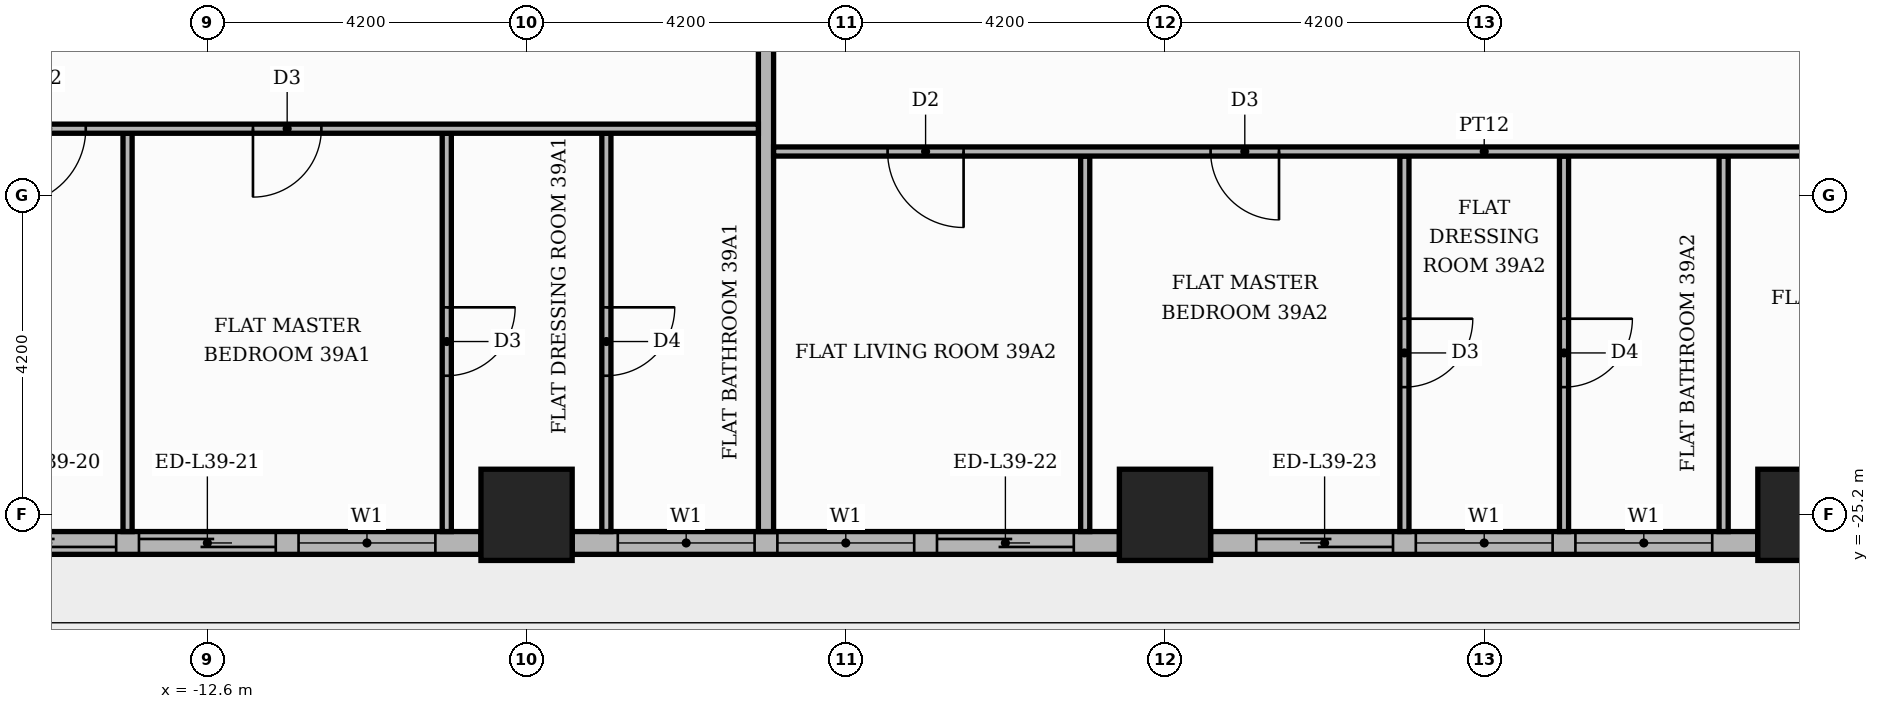
"""IFC4 building model, lengths in metres.
Left out: names, types, materials, properties, quantities, classifications, styles, units other than length and angle.
Written with IfcOpenShell. Run it as: python <this file> out.ifc"""

import sys

from ifc_helpers import new_model, si_unit, direction, frame, frame_2d, origin, origin_2d, place, context, subcontext, project, spatial, rectangle, extrude, element, fill, save


model = new_model("IFC4")
c1 = context("Model", 3, precision=1e-05, world=origin(), true_north=direction((0.0, 1.0)))
c2 = subcontext(c1, "Body", "Model", "MODEL_VIEW")
j1 = project(units=[si_unit("LENGTHUNIT", "METRE"), si_unit("PLANEANGLEUNIT", "RADIAN")], contexts=[c1])
p1 = place(None, origin())
s1 = spatial("IfcSite", under=j1, at=p1, CompositionType="ELEMENT")
p2 = place(p1, origin())
s2 = spatial("IfcBuilding", under=s1, at=p2, CompositionType="ELEMENT")
p3 = place(p2, frame((0.0, 0.0, 165.0)))
s3 = spatial("IfcBuildingStorey", under=s2, at=p3, CompositionType="ELEMENT", Elevation=165.0)
for number, where, z_axis, x_axis in (
    (1, (0.0, -25.2, 0.0), (0.0, 0.0, 1.0), (1.0, 0.0, 0.0)),
    (2, (8.4, -25.2, 0.0), (0.0, 0.0, 1.0), (1.0, 0.0, 0.0)),
    (3, (-8.4, -25.2, 0.0), (0.0, 0.0, 1.0), (1.0, 0.0, 0.0)),
):
    element("IfcColumn", number, at=place(p3, frame(where, z_axis=z_axis, x_axis=x_axis)), inside=s3, PredefinedType="COLUMN", context=c2, shape_type="SweptSolid", body=[
        extrude(rectangle(XDim=1.2, YDim=1.2, at=origin_2d()), origin(), (0.0, 0.0, 1.0), 3.9),
    ])
p4 = place(p3, frame((-16.2, -25.57, 0.0), z_axis=(0.0, 0.0, 1.0), x_axis=(1.0, 0.0, 0.0)))
e4 = element("IfcWall", 4, at=p4, inside=s3, PredefinedType="STANDARD", context=c2, shape_type="SweptSolid", body=[
    extrude(rectangle(XDim=7.2, YDim=0.3, at=frame_2d((3.6, 0.0))), origin(), (0.0, 0.0, 1.0), 3.48),
])
p5 = place(p4, frame((0.6, 0.0, 0.0)))
e5 = element("IfcOpeningElement", 5, at=p5, cuts=e4, PredefinedType="OPENING", context=c2, shape_type="SweptSolid", body=[
    extrude(rectangle(XDim=1.8, YDim=2.4, at=frame_2d((0.9, 1.2))), frame((0.0, 0.16, 0.0), z_axis=(0.0, -1.0, 0.0), x_axis=(1.0, 0.0, 0.0)), (0.0, 0.0, 1.0), 0.32),
])
p6 = place(p4, frame((2.7, 0.0, 0.0)))
e6 = element("IfcOpeningElement", 6, at=p6, cuts=e4, PredefinedType="OPENING", context=c2, shape_type="SweptSolid", body=[
    extrude(rectangle(XDim=1.8, YDim=2.4, at=frame_2d((0.9, 1.2))), frame((0.0, 0.16, 0.0), z_axis=(0.0, -1.0, 0.0), x_axis=(1.0, 0.0, 0.0)), (0.0, 0.0, 1.0), 0.32),
])
p7 = place(p4, frame((4.8, 0.0, 0.9)))
e7 = element("IfcOpeningElement", 7, at=p7, cuts=e4, PredefinedType="OPENING", context=c2, shape_type="SweptSolid", body=[
    extrude(rectangle(XDim=1.8, YDim=2.1, at=frame_2d((0.9, 1.05))), frame((0.0, 0.16, 0.0), z_axis=(0.0, -1.0, 0.0), x_axis=(1.0, 0.0, 0.0)), (0.0, 0.0, 1.0), 0.32),
])
p8 = place(p3, frame((-7.8, -25.57, 0.0), z_axis=(0.0, 0.0, 1.0), x_axis=(1.0, 0.0, 0.0)))
e8 = element("IfcWall", 8, at=p8, inside=s3, PredefinedType="STANDARD", context=c2, shape_type="SweptSolid", body=[
    extrude(rectangle(XDim=7.2, YDim=0.3, at=frame_2d((3.6, 0.0))), origin(), (0.0, 0.0, 1.0), 3.48),
])
p9 = place(p8, frame((0.6, 0.0, 0.9)))
e9 = element("IfcOpeningElement", 9, at=p9, cuts=e8, PredefinedType="OPENING", context=c2, shape_type="SweptSolid", body=[
    extrude(rectangle(XDim=1.8, YDim=2.1, at=frame_2d((0.9, 1.05))), frame((0.0, 0.16, 0.0), z_axis=(0.0, -1.0, 0.0), x_axis=(1.0, 0.0, 0.0)), (0.0, 0.0, 1.0), 0.32),
])
p10 = place(p8, frame((2.7, 0.0, 0.9)))
e10 = element("IfcOpeningElement", 10, at=p10, cuts=e8, PredefinedType="OPENING", context=c2, shape_type="SweptSolid", body=[
    extrude(rectangle(XDim=1.8, YDim=2.1, at=frame_2d((0.9, 1.05))), frame((0.0, 0.16, 0.0), z_axis=(0.0, -1.0, 0.0), x_axis=(1.0, 0.0, 0.0)), (0.0, 0.0, 1.0), 0.32),
])
p11 = place(p8, frame((4.8, 0.0, 0.0)))
e11 = element("IfcOpeningElement", 11, at=p11, cuts=e8, PredefinedType="OPENING", context=c2, shape_type="SweptSolid", body=[
    extrude(rectangle(XDim=1.8, YDim=2.4, at=frame_2d((0.9, 1.2))), frame((0.0, 0.16, 0.0), z_axis=(0.0, -1.0, 0.0), x_axis=(1.0, 0.0, 0.0)), (0.0, 0.0, 1.0), 0.32),
])
p12 = place(p3, frame((0.6, -25.57, 0.0), z_axis=(0.0, 0.0, 1.0), x_axis=(1.0, 0.0, 0.0)))
e12 = element("IfcWall", 12, at=p12, inside=s3, PredefinedType="STANDARD", context=c2, shape_type="SweptSolid", body=[
    extrude(rectangle(XDim=7.2, YDim=0.3, at=frame_2d((3.6, 0.0))), origin(), (0.0, 0.0, 1.0), 3.48),
])
p13 = place(p12, frame((0.6, 0.0, 0.0)))
e13 = element("IfcOpeningElement", 13, at=p13, cuts=e12, PredefinedType="OPENING", context=c2, shape_type="SweptSolid", body=[
    extrude(rectangle(XDim=1.8, YDim=2.4, at=frame_2d((0.9, 1.2))), frame((0.0, 0.16, 0.0), z_axis=(0.0, -1.0, 0.0), x_axis=(1.0, 0.0, 0.0)), (0.0, 0.0, 1.0), 0.32),
])
p14 = place(p12, frame((2.7, 0.0, 0.9)))
e14 = element("IfcOpeningElement", 14, at=p14, cuts=e12, PredefinedType="OPENING", context=c2, shape_type="SweptSolid", body=[
    extrude(rectangle(XDim=1.8, YDim=2.1, at=frame_2d((0.9, 1.05))), frame((0.0, 0.16, 0.0), z_axis=(0.0, -1.0, 0.0), x_axis=(1.0, 0.0, 0.0)), (0.0, 0.0, 1.0), 0.32),
])
p15 = place(p12, frame((4.8, 0.0, 0.9)))
e15 = element("IfcOpeningElement", 15, at=p15, cuts=e12, PredefinedType="OPENING", context=c2, shape_type="SweptSolid", body=[
    extrude(rectangle(XDim=1.8, YDim=2.1, at=frame_2d((0.9, 1.05))), frame((0.0, 0.16, 0.0), z_axis=(0.0, -1.0, 0.0), x_axis=(1.0, 0.0, 0.0)), (0.0, 0.0, 1.0), 0.32),
])
p16 = place(p3, frame((-13.65, -25.42, 0.0), z_axis=(0.0, 0.0, 1.0), x_axis=(0.0, 1.0, 0.0)))
e16 = element("IfcWall", 16, at=p16, inside=s3, PredefinedType="PARTITIONING", context=c2, shape_type="SweptSolid", body=[
    extrude(rectangle(XDim=5.24, YDim=0.12, at=frame_2d((2.62, 0.0))), origin(), (0.0, 0.0, 1.0), 3.48),
])
p17 = place(p3, frame((-9.45, -25.42, 0.0), z_axis=(0.0, 0.0, 1.0), x_axis=(0.0, 1.0, 0.0)))
e17 = element("IfcWall", 17, at=p17, inside=s3, PredefinedType="PARTITIONING", context=c2, shape_type="SweptSolid", body=[
    extrude(rectangle(XDim=5.24, YDim=0.12, at=frame_2d((2.62, 0.0))), origin(), (0.0, 0.0, 1.0), 3.48),
])
p18 = place(p17, frame((2.05, 0.0, 0.0)))
e18 = element("IfcOpeningElement", 18, at=p18, cuts=e17, PredefinedType="OPENING", context=c2, shape_type="SweptSolid", body=[
    extrude(rectangle(XDim=0.9, YDim=2.1, at=frame_2d((0.45, 1.05))), frame((0.0, 0.07, 0.0), z_axis=(0.0, -1.0, 0.0), x_axis=(1.0, 0.0, 0.0)), (0.0, 0.0, 1.0), 0.14),
])
p19 = place(p3, frame((-7.35, -25.42, 0.0), z_axis=(0.0, 0.0, 1.0), x_axis=(0.0, 1.0, 0.0)))
e19 = element("IfcWall", 19, at=p19, inside=s3, PredefinedType="PARTITIONING", context=c2, shape_type="SweptSolid", body=[
    extrude(rectangle(XDim=5.24, YDim=0.12, at=frame_2d((2.62, 0.0))), origin(), (0.0, 0.0, 1.0), 3.48),
])
p20 = place(p19, frame((2.05, 0.0, 0.0)))
e20 = element("IfcOpeningElement", 20, at=p20, cuts=e19, PredefinedType="OPENING", context=c2, shape_type="SweptSolid", body=[
    extrude(rectangle(XDim=0.9, YDim=2.1, at=frame_2d((0.45, 1.05))), frame((0.0, 0.07, 0.0), z_axis=(0.0, -1.0, 0.0), x_axis=(1.0, 0.0, 0.0)), (0.0, 0.0, 1.0), 0.14),
])
p21 = place(p3, frame((-5.25, -25.42, 0.0), z_axis=(0.0, 0.0, 1.0), x_axis=(0.0, 1.0, 0.0)))
e21 = element("IfcWall", 21, at=p21, inside=s3, PredefinedType="PARTITIONING", context=c2, shape_type="SweptSolid", body=[
    extrude(rectangle(XDim=11.67, YDim=0.2, at=frame_2d((5.835, 0.0))), origin(), (0.0, 0.0, 1.0), 3.48),
])
p22 = place(p3, frame((-1.05, -25.42, 0.0), z_axis=(0.0, 0.0, 1.0), x_axis=(0.0, 1.0, 0.0)))
e22 = element("IfcWall", 22, at=p22, inside=s3, PredefinedType="PARTITIONING", context=c2, shape_type="SweptSolid", body=[
    extrude(rectangle(XDim=4.94, YDim=0.12, at=frame_2d((2.47, 0.0))), origin(), (0.0, 0.0, 1.0), 3.48),
])
p23 = place(p3, frame((3.15, -25.42, 0.0), z_axis=(0.0, 0.0, 1.0), x_axis=(0.0, 1.0, 0.0)))
e23 = element("IfcWall", 23, at=p23, inside=s3, PredefinedType="PARTITIONING", context=c2, shape_type="SweptSolid", body=[
    extrude(rectangle(XDim=4.94, YDim=0.12, at=frame_2d((2.47, 0.0))), origin(), (0.0, 0.0, 1.0), 3.48),
])
p24 = place(p23, frame((1.9, 0.0, 0.0)))
e24 = element("IfcOpeningElement", 24, at=p24, cuts=e23, PredefinedType="OPENING", context=c2, shape_type="SweptSolid", body=[
    extrude(rectangle(XDim=0.9, YDim=2.1, at=frame_2d((0.45, 1.05))), frame((0.0, 0.07, 0.0), z_axis=(0.0, -1.0, 0.0), x_axis=(1.0, 0.0, 0.0)), (0.0, 0.0, 1.0), 0.14),
])
p25 = place(p3, frame((5.25, -25.42, 0.0), z_axis=(0.0, 0.0, 1.0), x_axis=(0.0, 1.0, 0.0)))
e25 = element("IfcWall", 25, at=p25, inside=s3, PredefinedType="PARTITIONING", context=c2, shape_type="SweptSolid", body=[
    extrude(rectangle(XDim=4.94, YDim=0.12, at=frame_2d((2.47, 0.0))), origin(), (0.0, 0.0, 1.0), 3.48),
])
p26 = place(p25, frame((1.9, 0.0, 0.0)))
e26 = element("IfcOpeningElement", 26, at=p26, cuts=e25, PredefinedType="OPENING", context=c2, shape_type="SweptSolid", body=[
    extrude(rectangle(XDim=0.9, YDim=2.1, at=frame_2d((0.45, 1.05))), frame((0.0, 0.07, 0.0), z_axis=(0.0, -1.0, 0.0), x_axis=(1.0, 0.0, 0.0)), (0.0, 0.0, 1.0), 0.14),
])
p27 = place(p3, frame((7.35, -25.42, 0.0), z_axis=(0.0, 0.0, 1.0), x_axis=(0.0, 1.0, 0.0)))
e27 = element("IfcWall", 27, at=p27, inside=s3, PredefinedType="PARTITIONING", context=c2, shape_type="SweptSolid", body=[
    extrude(rectangle(XDim=4.94, YDim=0.12, at=frame_2d((2.47, 0.0))), origin(), (0.0, 0.0, 1.0), 3.48),
])
p28 = place(p3, frame((-5.15, -20.42, 0.0), z_axis=(0.0, 0.0, 1.0), x_axis=(1.0, 0.0, 0.0)))
e28 = element("IfcWall", 28, at=p28, inside=s3, PredefinedType="PARTITIONING", context=c2, shape_type="SweptSolid", body=[
    extrude(rectangle(XDim=18.7, YDim=0.12, at=frame_2d((9.35, 0.0))), origin(), (0.0, 0.0, 1.0), 3.48),
])
p29 = place(p28, frame((1.5, 0.0, 0.0)))
e29 = element("IfcOpeningElement", 29, at=p29, cuts=e28, PredefinedType="OPENING", context=c2, shape_type="SweptSolid", body=[
    extrude(rectangle(XDim=1.0, YDim=2.1, at=frame_2d((0.5, 1.05))), frame((0.0, 0.07, 0.0), z_axis=(0.0, -1.0, 0.0), x_axis=(1.0, 0.0, 0.0)), (0.0, 0.0, 1.0), 0.14),
])
p30 = place(p28, frame((5.75, 0.0, 0.0)))
e30 = element("IfcOpeningElement", 30, at=p30, cuts=e28, PredefinedType="OPENING", context=c2, shape_type="SweptSolid", body=[
    extrude(rectangle(XDim=0.9, YDim=2.1, at=frame_2d((0.45, 1.05))), frame((0.0, 0.07, 0.0), z_axis=(0.0, -1.0, 0.0), x_axis=(1.0, 0.0, 0.0)), (0.0, 0.0, 1.0), 0.14),
])
p31 = place(p28, frame((14.15, 0.0, 0.0)))
e31 = element("IfcOpeningElement", 31, at=p31, cuts=e28, PredefinedType="OPENING", context=c2, shape_type="SweptSolid", body=[
    extrude(rectangle(XDim=0.9, YDim=2.1, at=frame_2d((0.45, 1.05))), frame((0.0, 0.07, 0.0), z_axis=(0.0, -1.0, 0.0), x_axis=(1.0, 0.0, 0.0)), (0.0, 0.0, 1.0), 0.14),
])
p32 = place(p3, frame((-25.42, -20.12, 0.0), z_axis=(0.0, 0.0, 1.0), x_axis=(1.0, 0.0, 0.0)))
e32 = element("IfcWall", 32, at=p32, inside=s3, PredefinedType="PARTITIONING", context=c2, shape_type="SweptSolid", body=[
    extrude(rectangle(XDim=20.07, YDim=0.12, at=frame_2d((10.035, 0.0))), origin(), (0.0, 0.0, 1.0), 3.48),
])
p33 = place(p32, frame((10.22, 0.0, 0.0)))
e33 = element("IfcOpeningElement", 33, at=p33, cuts=e32, PredefinedType="OPENING", context=c2, shape_type="SweptSolid", body=[
    extrude(rectangle(XDim=1.0, YDim=2.1, at=frame_2d((0.5, 1.05))), frame((0.0, 0.07, 0.0), z_axis=(0.0, -1.0, 0.0), x_axis=(1.0, 0.0, 0.0)), (0.0, 0.0, 1.0), 0.14),
])
p34 = place(p32, frame((13.42, 0.0, 0.0)))
e34 = element("IfcOpeningElement", 34, at=p34, cuts=e32, PredefinedType="OPENING", context=c2, shape_type="SweptSolid", body=[
    extrude(rectangle(XDim=0.9, YDim=2.1, at=frame_2d((0.45, 1.05))), frame((0.0, 0.07, 0.0), z_axis=(0.0, -1.0, 0.0), x_axis=(1.0, 0.0, 0.0)), (0.0, 0.0, 1.0), 0.14),
])
p35 = place(p5, origin())
e35 = element("IfcDoor", 35, at=p35, inside=s3, OperationType="SLIDING_TO_LEFT", PredefinedType="DOOR", context=c2, shape_type="SweptSolid", body=[
    extrude(rectangle(XDim=1.8, YDim=2.4, at=frame_2d((0.9, 1.2))), frame((0.0, 0.025, 0.0), z_axis=(0.0, -1.0, 0.0), x_axis=(1.0, 0.0, 0.0)), (0.0, 0.0, 1.0), 0.05),
])
fill(e5, e35)
p36 = place(p6, origin())
e36 = element("IfcDoor", 36, at=p36, inside=s3, OperationType="SLIDING_TO_RIGHT", PredefinedType="DOOR", context=c2, shape_type="SweptSolid", body=[
    extrude(rectangle(XDim=1.8, YDim=2.4, at=frame_2d((0.9, 1.2))), frame((0.0, 0.025, 0.0), z_axis=(0.0, -1.0, 0.0), x_axis=(1.0, 0.0, 0.0)), (0.0, 0.0, 1.0), 0.05),
])
fill(e6, e36)
p37 = place(p7, origin())
e37 = element("IfcWindow", 37, at=p37, inside=s3, PartitioningType="SINGLE_PANEL", PredefinedType="WINDOW", context=c2, shape_type="SweptSolid", body=[
    extrude(rectangle(XDim=1.8, YDim=2.1, at=frame_2d((0.9, 1.05))), frame((0.0, 0.03, 0.0), z_axis=(0.0, -1.0, 0.0), x_axis=(1.0, 0.0, 0.0)), (0.0, 0.0, 1.0), 0.06),
])
fill(e7, e37)
p38 = place(p9, origin())
e38 = element("IfcWindow", 38, at=p38, inside=s3, PartitioningType="SINGLE_PANEL", PredefinedType="WINDOW", context=c2, shape_type="SweptSolid", body=[
    extrude(rectangle(XDim=1.8, YDim=2.1, at=frame_2d((0.9, 1.05))), frame((0.0, 0.03, 0.0), z_axis=(0.0, -1.0, 0.0), x_axis=(1.0, 0.0, 0.0)), (0.0, 0.0, 1.0), 0.06),
])
fill(e9, e38)
p39 = place(p10, origin())
e39 = element("IfcWindow", 39, at=p39, inside=s3, PartitioningType="SINGLE_PANEL", PredefinedType="WINDOW", context=c2, shape_type="SweptSolid", body=[
    extrude(rectangle(XDim=1.8, YDim=2.1, at=frame_2d((0.9, 1.05))), frame((0.0, 0.03, 0.0), z_axis=(0.0, -1.0, 0.0), x_axis=(1.0, 0.0, 0.0)), (0.0, 0.0, 1.0), 0.06),
])
fill(e10, e39)
p40 = place(p11, origin())
e40 = element("IfcDoor", 40, at=p40, inside=s3, OperationType="SLIDING_TO_RIGHT", PredefinedType="DOOR", context=c2, shape_type="SweptSolid", body=[
    extrude(rectangle(XDim=1.8, YDim=2.4, at=frame_2d((0.9, 1.2))), frame((0.0, 0.025, 0.0), z_axis=(0.0, -1.0, 0.0), x_axis=(1.0, 0.0, 0.0)), (0.0, 0.0, 1.0), 0.05),
])
fill(e11, e40)
p41 = place(p13, origin())
e41 = element("IfcDoor", 41, at=p41, inside=s3, OperationType="SLIDING_TO_LEFT", PredefinedType="DOOR", context=c2, shape_type="SweptSolid", body=[
    extrude(rectangle(XDim=1.8, YDim=2.4, at=frame_2d((0.9, 1.2))), frame((0.0, 0.025, 0.0), z_axis=(0.0, -1.0, 0.0), x_axis=(1.0, 0.0, 0.0)), (0.0, 0.0, 1.0), 0.05),
])
fill(e13, e41)
p42 = place(p14, origin())
e42 = element("IfcWindow", 42, at=p42, inside=s3, PartitioningType="SINGLE_PANEL", PredefinedType="WINDOW", context=c2, shape_type="SweptSolid", body=[
    extrude(rectangle(XDim=1.8, YDim=2.1, at=frame_2d((0.9, 1.05))), frame((0.0, 0.03, 0.0), z_axis=(0.0, -1.0, 0.0), x_axis=(1.0, 0.0, 0.0)), (0.0, 0.0, 1.0), 0.06),
])
fill(e14, e42)
p43 = place(p15, origin())
e43 = element("IfcWindow", 43, at=p43, inside=s3, PartitioningType="SINGLE_PANEL", PredefinedType="WINDOW", context=c2, shape_type="SweptSolid", body=[
    extrude(rectangle(XDim=1.8, YDim=2.1, at=frame_2d((0.9, 1.05))), frame((0.0, 0.03, 0.0), z_axis=(0.0, -1.0, 0.0), x_axis=(1.0, 0.0, 0.0)), (0.0, 0.0, 1.0), 0.06),
])
fill(e15, e43)
p44 = place(p33, frame((1.0, 0.0, 0.0), z_axis=(0.0, 0.0, 1.0), x_axis=(-1.0, 0.0, 0.0)))
e44 = element("IfcDoor", 44, at=p44, inside=s3, OperationType="SINGLE_SWING_LEFT", PredefinedType="DOOR", context=c2, shape_type="SweptSolid", body=[
    extrude(rectangle(XDim=1.0, YDim=2.1, at=frame_2d((0.5, 1.05))), frame((0.0, 0.025, 0.0), z_axis=(0.0, -1.0, 0.0), x_axis=(1.0, 0.0, 0.0)), (0.0, 0.0, 1.0), 0.05),
])
fill(e33, e44)
p45 = place(p34, frame((0.9, 0.0, 0.0), z_axis=(0.0, 0.0, 1.0), x_axis=(-1.0, 0.0, 0.0)))
e45 = element("IfcDoor", 45, at=p45, inside=s3, OperationType="SINGLE_SWING_LEFT", PredefinedType="DOOR", context=c2, shape_type="SweptSolid", body=[
    extrude(rectangle(XDim=0.9, YDim=2.1, at=frame_2d((0.45, 1.05))), frame((0.0, 0.025, 0.0), z_axis=(0.0, -1.0, 0.0), x_axis=(1.0, 0.0, 0.0)), (0.0, 0.0, 1.0), 0.05),
])
fill(e34, e45)
p46 = place(p18, frame((0.9, 0.0, 0.0), z_axis=(0.0, 0.0, 1.0), x_axis=(-1.0, 0.0, 0.0)))
e46 = element("IfcDoor", 46, at=p46, inside=s3, OperationType="SINGLE_SWING_RIGHT", PredefinedType="DOOR", context=c2, shape_type="SweptSolid", body=[
    extrude(rectangle(XDim=0.9, YDim=2.1, at=frame_2d((0.45, 1.05))), frame((0.0, 0.025, 0.0), z_axis=(0.0, -1.0, 0.0), x_axis=(1.0, 0.0, 0.0)), (0.0, 0.0, 1.0), 0.05),
])
fill(e18, e46)
p47 = place(p20, frame((0.9, 0.0, 0.0), z_axis=(0.0, 0.0, 1.0), x_axis=(-1.0, 0.0, 0.0)))
e47 = element("IfcDoor", 47, at=p47, inside=s3, OperationType="SINGLE_SWING_RIGHT", PredefinedType="DOOR", context=c2, shape_type="SweptSolid", body=[
    extrude(rectangle(XDim=0.9, YDim=2.1, at=frame_2d((0.45, 1.05))), frame((0.0, 0.025, 0.0), z_axis=(0.0, -1.0, 0.0), x_axis=(1.0, 0.0, 0.0)), (0.0, 0.0, 1.0), 0.05),
])
fill(e20, e47)
p48 = place(p29, frame((1.0, 0.0, 0.0), z_axis=(0.0, 0.0, 1.0), x_axis=(-1.0, 0.0, 0.0)))
e48 = element("IfcDoor", 48, at=p48, inside=s3, OperationType="SINGLE_SWING_RIGHT", PredefinedType="DOOR", context=c2, shape_type="SweptSolid", body=[
    extrude(rectangle(XDim=1.0, YDim=2.1, at=frame_2d((0.5, 1.05))), frame((0.0, 0.025, 0.0), z_axis=(0.0, -1.0, 0.0), x_axis=(1.0, 0.0, 0.0)), (0.0, 0.0, 1.0), 0.05),
])
fill(e29, e48)
p49 = place(p30, frame((0.9, 0.0, 0.0), z_axis=(0.0, 0.0, 1.0), x_axis=(-1.0, 0.0, 0.0)))
e49 = element("IfcDoor", 49, at=p49, inside=s3, OperationType="SINGLE_SWING_RIGHT", PredefinedType="DOOR", context=c2, shape_type="SweptSolid", body=[
    extrude(rectangle(XDim=0.9, YDim=2.1, at=frame_2d((0.45, 1.05))), frame((0.0, 0.025, 0.0), z_axis=(0.0, -1.0, 0.0), x_axis=(1.0, 0.0, 0.0)), (0.0, 0.0, 1.0), 0.05),
])
fill(e30, e49)
p50 = place(p24, frame((0.9, 0.0, 0.0), z_axis=(0.0, 0.0, 1.0), x_axis=(-1.0, 0.0, 0.0)))
e50 = element("IfcDoor", 50, at=p50, inside=s3, OperationType="SINGLE_SWING_RIGHT", PredefinedType="DOOR", context=c2, shape_type="SweptSolid", body=[
    extrude(rectangle(XDim=0.9, YDim=2.1, at=frame_2d((0.45, 1.05))), frame((0.0, 0.025, 0.0), z_axis=(0.0, -1.0, 0.0), x_axis=(1.0, 0.0, 0.0)), (0.0, 0.0, 1.0), 0.05),
])
fill(e24, e50)
p51 = place(p26, frame((0.9, 0.0, 0.0), z_axis=(0.0, 0.0, 1.0), x_axis=(-1.0, 0.0, 0.0)))
e51 = element("IfcDoor", 51, at=p51, inside=s3, OperationType="SINGLE_SWING_RIGHT", PredefinedType="DOOR", context=c2, shape_type="SweptSolid", body=[
    extrude(rectangle(XDim=0.9, YDim=2.1, at=frame_2d((0.45, 1.05))), frame((0.0, 0.025, 0.0), z_axis=(0.0, -1.0, 0.0), x_axis=(1.0, 0.0, 0.0)), (0.0, 0.0, 1.0), 0.05),
])
fill(e26, e51)
save(model, sys.argv[1])
